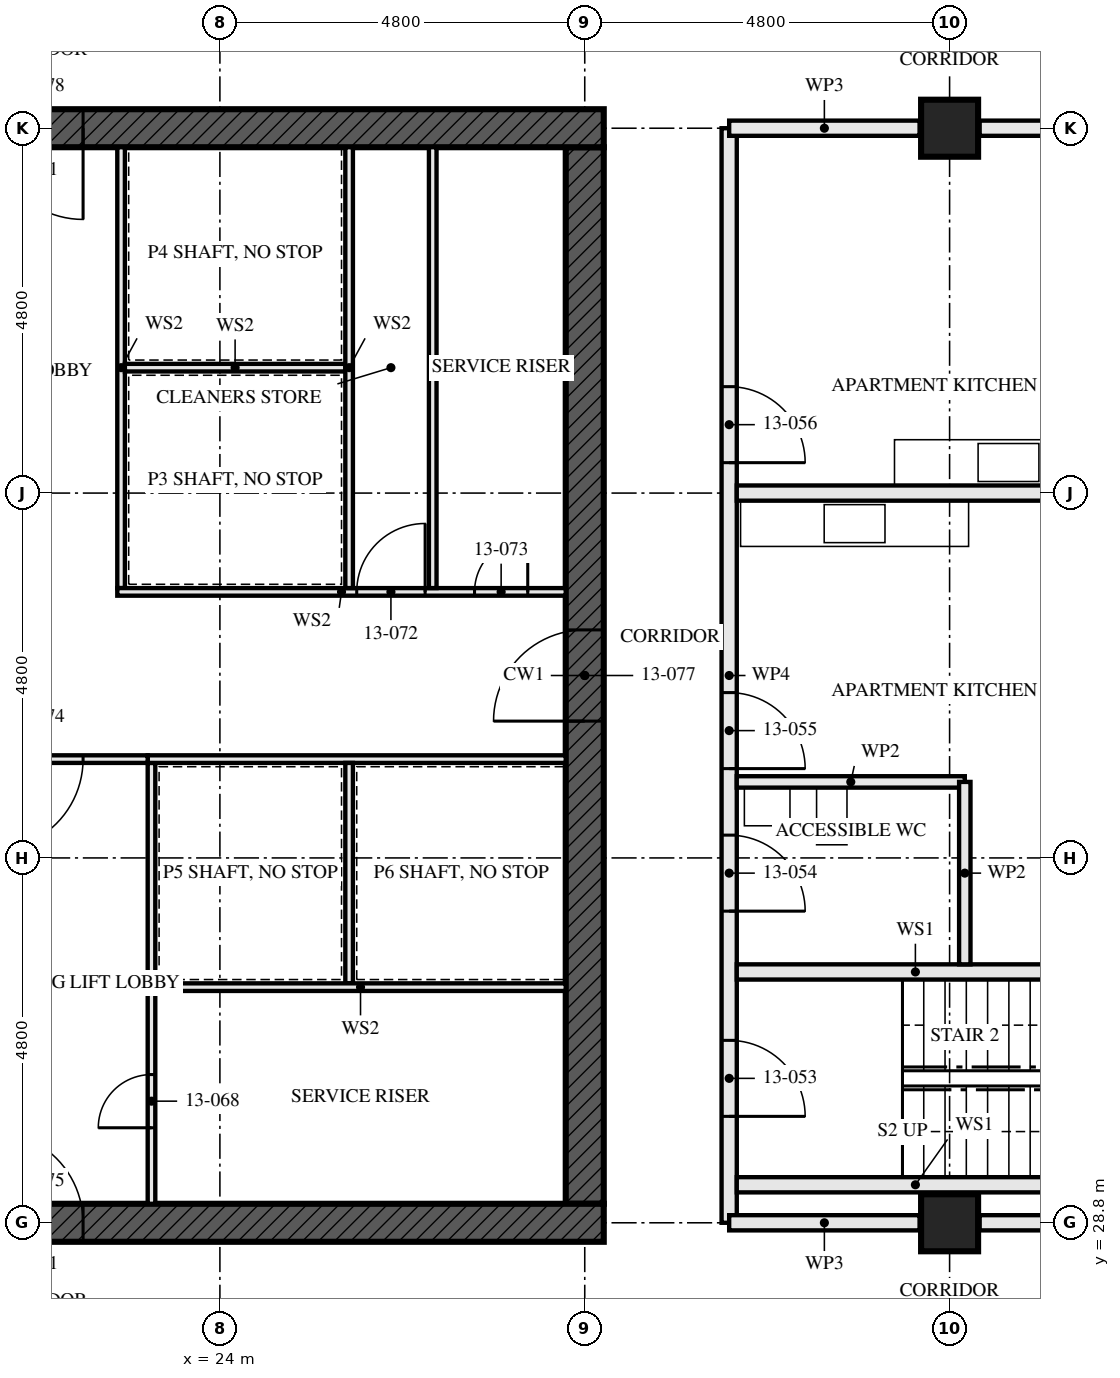
"""IFC4 building model, lengths in metres.
Left out: names, types, materials, properties, quantities, classifications, styles, units other than length and angle.
Written with IfcOpenShell. Run it as: python <this file> out.ifc"""

import sys

from ifc_helpers import new_model, si_unit, direction, frame, frame_2d, origin, origin_2d, place, context, subcontext, project, spatial, rectangle, hollow_rectangle, extrude, element, fill, save


model = new_model("IFC4")
c1 = context("Model", 3, precision=1e-05, world=origin(), true_north=direction((0.0, 1.0)))
c2 = subcontext(c1, "Body", "Model", "MODEL_VIEW")
j1 = project(units=[si_unit("LENGTHUNIT", "METRE"), si_unit("PLANEANGLEUNIT", "RADIAN")], contexts=[c1])
p1 = place(None, origin())
s1 = spatial("IfcSite", under=j1, at=p1, CompositionType="ELEMENT")
p2 = place(p1, origin())
s2 = spatial("IfcBuilding", under=s1, at=p2, CompositionType="ELEMENT")
p3 = place(p2, frame((0.0, 0.0, 51.5)))
s3 = spatial("IfcBuildingStorey", under=s2, at=p3, CompositionType="ELEMENT", Elevation=51.5)
for number, where, z_axis, x_axis in (
    (1, (33.6, 28.8, 0.0), (0.0, 0.0, 1.0), (0.0, 1.0, 0.0)),
    (2, (33.6, 43.2, 0.0), (0.0, 0.0, 1.0), (0.0, 1.0, 0.0)),
):
    element("IfcColumn", number, at=place(p3, frame(where, z_axis=z_axis, x_axis=x_axis)), inside=s3, PredefinedType="COLUMN", context=c2, shape_type="SweptSolid", body=[
        extrude(hollow_rectangle(XDim=0.75, YDim=0.75, WallThickness=0.08, at=origin_2d()), origin(), (0.0, 0.0, 1.0), 3.5),
    ])
p4 = place(p3, frame((14.15, 28.8, -0.17), z_axis=(0.0, 0.0, 1.0), x_axis=(1.0, 0.0, 0.0)))
e3 = element("IfcWall", 3, at=p4, inside=s3, PredefinedType="SHEAR", context=c2, shape_type="SweptSolid", body=[
    extrude(rectangle(XDim=14.9, YDim=0.5, at=frame_2d((7.45, 0.0))), origin(), (0.0, 0.0, 1.0), 3.5),
])
p5 = place(p4, frame((6.85, 0.0, 0.17)))
e4 = element("IfcOpeningElement", 4, at=p5, cuts=e3, PredefinedType="OPENING", context=c2, shape_type="SweptSolid", body=[
    extrude(rectangle(XDim=1.2, YDim=2.1, at=frame_2d((0.6, 1.05))), frame((0.0, 0.26, 0.0), z_axis=(0.0, -1.0, 0.0), x_axis=(1.0, 0.0, 0.0)), (0.0, 0.0, 1.0), 0.521),
])
p6 = place(p3, frame((29.05, 43.2, -0.17), z_axis=(0.0, 0.0, 1.0), x_axis=(-1.0, 0.0, 0.0)))
e5 = element("IfcWall", 5, at=p6, inside=s3, PredefinedType="SHEAR", context=c2, shape_type="SweptSolid", body=[
    extrude(rectangle(XDim=14.9, YDim=0.5, at=frame_2d((7.45, 0.0))), origin(), (0.0, 0.0, 1.0), 3.5),
])
p7 = place(p6, frame((6.85, 0.0, 0.17)))
e6 = element("IfcOpeningElement", 6, at=p7, cuts=e5, PredefinedType="OPENING", context=c2, shape_type="SweptSolid", body=[
    extrude(rectangle(XDim=1.2, YDim=2.1, at=frame_2d((0.6, 1.05))), frame((0.0, 0.26, 0.0), z_axis=(0.0, -1.0, 0.0), x_axis=(1.0, 0.0, 0.0)), (0.0, 0.0, 1.0), 0.521),
])
p8 = place(p3, frame((28.8, 29.05, -0.17), z_axis=(0.0, 0.0, 1.0), x_axis=(0.0, 1.0, 0.0)))
e7 = element("IfcWall", 7, at=p8, inside=s3, PredefinedType="SHEAR", context=c2, shape_type="SweptSolid", body=[
    extrude(rectangle(XDim=13.9, YDim=0.5, at=frame_2d((6.95, 0.0))), origin(), (0.0, 0.0, 1.0), 3.5),
])
p9 = place(p8, frame((6.35, 0.0, 0.17)))
e8 = element("IfcOpeningElement", 8, at=p9, cuts=e7, PredefinedType="OPENING", context=c2, shape_type="SweptSolid", body=[
    extrude(rectangle(XDim=1.2, YDim=2.1, at=frame_2d((0.6, 1.05))), frame((0.0, 0.26, 0.0), z_axis=(0.0, -1.0, 0.0), x_axis=(1.0, 0.0, 0.0)), (0.0, 0.0, 1.0), 0.521),
])
for number, where, z_axis, x_axis in (
    (9, (35.5, 29.3, 0.0), (0.0, 0.0, 1.0), (-1.0, 0.0, 0.0)),
    (10, (35.5, 32.1, 0.0), (0.0, 0.0, 1.0), (-1.0, 0.0, 0.0)),
):
    element("IfcWall", number, at=place(p3, frame(where, z_axis=z_axis, x_axis=x_axis)), inside=s3, PredefinedType="SOLIDWALL", context=c2, shape_type="SweptSolid", body=[
        extrude(rectangle(XDim=4.7, YDim=0.2, at=frame_2d((2.35, 0.0))), origin(), (0.0, 0.0, 1.0), 2.99),
    ])
p10 = place(p3, frame((33.8, 32.2, 0.0), z_axis=(0.0, 0.0, 1.0), x_axis=(0.0, 1.0, 0.0)))
e11 = element("IfcWall", 11, at=p10, inside=s3, PredefinedType="PARTITIONING", context=c2, shape_type="SweptSolid", body=[
    extrude(rectangle(XDim=2.4, YDim=0.15, at=frame_2d((1.2, 0.0))), origin(), (0.0, 0.0, 1.0), 2.55),
])
p11 = place(p3, frame((33.8, 34.6, 0.0), z_axis=(0.0, 0.0, 1.0), x_axis=(-1.0, 0.0, 0.0)))
e12 = element("IfcWall", 12, at=p11, inside=s3, PredefinedType="PARTITIONING", context=c2, shape_type="SweptSolid", body=[
    extrude(rectangle(XDim=3.0, YDim=0.15, at=frame_2d((1.5, 0.0))), origin(), (0.0, 0.0, 1.0), 3.33),
])
p12 = place(p3, frame((42.805, 38.4, 0.0), z_axis=(0.0, 0.0, 1.0), x_axis=(-1.0, 0.0, 0.0)))
e13 = element("IfcWall", 13, at=p12, inside=s3, PredefinedType="PARTITIONING", context=c2, shape_type="SweptSolid", body=[
    extrude(rectangle(XDim=12.005, YDim=0.2, at=frame_2d((6.002, 0.0))), origin(), (0.0, 0.0, 1.0), 2.55),
])
p13 = place(p3, frame((30.7, 28.8, 0.0), z_axis=(0.0, 0.0, 1.0), x_axis=(0.0, 1.0, 0.0)))
e14 = element("IfcWall", 14, at=p13, inside=s3, PredefinedType="PARTITIONING", context=c2, shape_type="SweptSolid", body=[
    extrude(rectangle(XDim=14.4, YDim=0.2, at=frame_2d((7.2, 0.0))), origin(), (0.0, 0.0, 1.0), 2.55),
])
p14 = place(p13, frame((1.4, 0.0, 0.0)))
e15 = element("IfcOpeningElement", 15, at=p14, cuts=e14, PredefinedType="OPENING", context=c2, shape_type="SweptSolid", body=[
    extrude(rectangle(XDim=1.0, YDim=2.1, at=frame_2d((0.5, 1.05))), frame((0.0, 0.111, 0.0), z_axis=(0.0, -1.0, 0.0), x_axis=(1.0, 0.0, 0.0)), (0.0, 0.0, 1.0), 0.221),
])
p15 = place(p13, frame((4.1, 0.0, 0.0)))
e16 = element("IfcOpeningElement", 16, at=p15, cuts=e14, PredefinedType="OPENING", context=c2, shape_type="SweptSolid", body=[
    extrude(rectangle(XDim=1.0, YDim=2.1, at=frame_2d((0.5, 1.05))), frame((0.0, 0.111, 0.0), z_axis=(0.0, -1.0, 0.0), x_axis=(1.0, 0.0, 0.0)), (0.0, 0.0, 1.0), 0.221),
])
p16 = place(p13, frame((5.975, 0.0, 0.0)))
e17 = element("IfcOpeningElement", 17, at=p16, cuts=e14, PredefinedType="OPENING", context=c2, shape_type="SweptSolid", body=[
    extrude(rectangle(XDim=1.0, YDim=2.1, at=frame_2d((0.5, 1.05))), frame((0.0, 0.111, 0.0), z_axis=(0.0, -1.0, 0.0), x_axis=(1.0, 0.0, 0.0)), (0.0, 0.0, 1.0), 0.221),
])
p17 = place(p13, frame((10.0, 0.0, 0.0)))
e18 = element("IfcOpeningElement", 18, at=p17, cuts=e14, PredefinedType="OPENING", context=c2, shape_type="SweptSolid", body=[
    extrude(rectangle(XDim=1.0, YDim=2.1, at=frame_2d((0.5, 1.05))), frame((0.0, 0.111, 0.0), z_axis=(0.0, -1.0, 0.0), x_axis=(1.0, 0.0, 0.0)), (0.0, 0.0, 1.0), 0.221),
])
for number, where, z_axis, x_axis in (
    (19, (26.8, 37.15, 0.0), (0.0, 0.0, 1.0), (0.0, 1.0, 0.0)),
    (20, (22.7, 37.15, 0.0), (0.0, 0.0, 1.0), (0.0, 1.0, 0.0)),
):
    element("IfcWall", number, at=place(p3, frame(where, z_axis=z_axis, x_axis=x_axis)), inside=s3, PredefinedType="SOLIDWALL", context=c2, shape_type="SweptSolid", body=[
        extrude(rectangle(XDim=5.8, YDim=0.1, at=frame_2d((2.9, 0.0))), origin(), (0.0, 0.0, 1.0), 3.33),
    ])
p18 = place(p3, frame((23.1, 29.05, 0.0), z_axis=(0.0, 0.0, 1.0), x_axis=(0.0, 1.0, 0.0)))
e21 = element("IfcWall", 21, at=p18, inside=s3, PredefinedType="SOLIDWALL", context=c2, shape_type="SweptSolid", body=[
    extrude(rectangle(XDim=5.8, YDim=0.1, at=frame_2d((2.9, 0.0))), origin(), (0.0, 0.0, 1.0), 3.33),
])
p19 = place(p18, frame((1.0, 0.0, 0.0)))
e22 = element("IfcOpeningElement", 22, at=p19, cuts=e21, PredefinedType="OPENING", context=c2, shape_type="SweptSolid", body=[
    extrude(rectangle(XDim=0.7, YDim=2.1, at=frame_2d((0.35, 1.05))), frame((0.0, 0.061, 0.0), z_axis=(0.0, -1.0, 0.0), x_axis=(1.0, 0.0, 0.0)), (0.0, 0.0, 1.0), 0.121),
])
p20 = place(p3, frame((23.05, 34.9, 0.0), z_axis=(0.0, 0.0, 1.0), x_axis=(1.0, 0.0, 0.0)))
e23 = element("IfcWall", 23, at=p20, inside=s3, PredefinedType="SOLIDWALL", context=c2, shape_type="SweptSolid", body=[
    extrude(rectangle(XDim=5.5, YDim=0.1, at=frame_2d((2.75, 0.0))), origin(), (0.0, 0.0, 1.0), 3.33),
])
p21 = place(p3, frame((22.65, 37.1, 0.0), z_axis=(0.0, 0.0, 1.0), x_axis=(1.0, 0.0, 0.0)))
e24 = element("IfcWall", 24, at=p21, inside=s3, PredefinedType="SOLIDWALL", context=c2, shape_type="SweptSolid", body=[
    extrude(rectangle(XDim=5.9, YDim=0.1, at=frame_2d((2.95, 0.0))), origin(), (0.0, 0.0, 1.0), 3.33),
])
p22 = place(p21, frame((3.15, 0.0, 0.0)))
e25 = element("IfcOpeningElement", 25, at=p22, cuts=e24, PredefinedType="OPENING", context=c2, shape_type="SweptSolid", body=[
    extrude(rectangle(XDim=0.9, YDim=2.1, at=frame_2d((0.45, 1.05))), frame((0.0, 0.061, 0.0), z_axis=(0.0, -1.0, 0.0), x_axis=(1.0, 0.0, 0.0)), (0.0, 0.0, 1.0), 0.121),
])
p23 = place(p21, frame((4.7, 0.0, 0.0)))
e26 = element("IfcOpeningElement", 26, at=p23, cuts=e24, PredefinedType="OPENING", context=c2, shape_type="SweptSolid", body=[
    extrude(rectangle(XDim=0.7, YDim=2.1, at=frame_2d((0.35, 1.05))), frame((0.0, 0.061, 0.0), z_axis=(0.0, -1.0, 0.0), x_axis=(1.0, 0.0, 0.0)), (0.0, 0.0, 1.0), 0.121),
])
p24 = place(p3, frame((20.55, 34.9, 0.0), z_axis=(0.0, 0.0, 1.0), x_axis=(1.0, 0.0, 0.0)))
e27 = element("IfcWall", 27, at=p24, inside=s3, PredefinedType="SOLIDWALL", context=c2, shape_type="SweptSolid", body=[
    extrude(rectangle(XDim=2.5, YDim=0.1, at=frame_2d((1.25, 0.0))), origin(), (0.0, 0.0, 1.0), 3.33),
])
p25 = place(p24, frame((0.45, 0.0, 0.0)))
e28 = element("IfcOpeningElement", 28, at=p25, cuts=e27, PredefinedType="OPENING", context=c2, shape_type="SweptSolid", body=[
    extrude(rectangle(XDim=1.2, YDim=2.1, at=frame_2d((0.6, 1.05))), frame((0.0, 0.061, 0.0), z_axis=(0.0, -1.0, 0.0), x_axis=(1.0, 0.0, 0.0)), (0.0, 0.0, 1.0), 0.121),
])
p26 = place(p3, frame((22.75, 40.05, 0.0), z_axis=(0.0, 0.0, 1.0), x_axis=(1.0, 0.0, 0.0)))
e29 = element("IfcWall", 29, at=p26, inside=s3, PredefinedType="SOLIDWALL", context=c2, shape_type="SweptSolid", body=[
    extrude(rectangle(XDim=2.9, YDim=0.1, at=frame_2d((1.45, 0.0))), origin(), (0.0, 0.0, 1.0), 3.33),
])
p27 = place(p3, frame((25.7, 37.15, 0.0), z_axis=(0.0, 0.0, 1.0), x_axis=(0.0, 1.0, 0.0)))
e30 = element("IfcWall", 30, at=p27, inside=s3, PredefinedType="SOLIDWALL", context=c2, shape_type="SweptSolid", body=[
    extrude(rectangle(XDim=5.8, YDim=0.1, at=frame_2d((2.9, 0.0))), origin(), (0.0, 0.0, 1.0), 3.33),
])
p28 = place(p3, frame((25.7, 31.95, 0.0), z_axis=(0.0, 0.0, 1.0), x_axis=(0.0, 1.0, 0.0)))
e31 = element("IfcWall", 31, at=p28, inside=s3, PredefinedType="SOLIDWALL", context=c2, shape_type="SweptSolid", body=[
    extrude(rectangle(XDim=2.9, YDim=0.1, at=frame_2d((1.45, 0.0))), origin(), (0.0, 0.0, 1.0), 3.33),
])
p29 = place(p3, frame((23.15, 31.9, 0.0), z_axis=(0.0, 0.0, 1.0), x_axis=(1.0, 0.0, 0.0)))
e32 = element("IfcWall", 32, at=p29, inside=s3, PredefinedType="SOLIDWALL", context=c2, shape_type="SweptSolid", body=[
    extrude(rectangle(XDim=5.4, YDim=0.1, at=frame_2d((2.7, 0.0))), origin(), (0.0, 0.0, 1.0), 3.33),
])
p30 = place(p3, frame((38.005, 28.8, 0.0), z_axis=(0.0, 0.0, 1.0), x_axis=(-1.0, 0.0, 0.0)))
e33 = element("IfcWall", 33, at=p30, inside=s3, PredefinedType="PARTITIONING", context=c2, shape_type="SweptSolid", body=[
    extrude(rectangle(XDim=4.01, YDim=0.2, at=frame_2d((2.005, 0.0))), origin(), (0.0, 0.0, 1.0), 2.32),
])
p31 = place(p3, frame((33.205, 28.8, 0.0), z_axis=(0.0, 0.0, 1.0), x_axis=(-1.0, 0.0, 0.0)))
e34 = element("IfcWall", 34, at=p31, inside=s3, PredefinedType="PARTITIONING", context=c2, shape_type="SweptSolid", body=[
    extrude(rectangle(XDim=2.505, YDim=0.2, at=frame_2d((1.252, 0.0))), origin(), (0.0, 0.0, 1.0), 2.32),
])
p32 = place(p3, frame((38.005, 43.2, 0.0), z_axis=(0.0, 0.0, 1.0), x_axis=(-1.0, 0.0, 0.0)))
e35 = element("IfcWall", 35, at=p32, inside=s3, PredefinedType="PARTITIONING", context=c2, shape_type="SweptSolid", body=[
    extrude(rectangle(XDim=4.01, YDim=0.2, at=frame_2d((2.005, 0.0))), origin(), (0.0, 0.0, 1.0), 2.32),
])
p33 = place(p3, frame((33.205, 43.2, 0.0), z_axis=(0.0, 0.0, 1.0), x_axis=(-1.0, 0.0, 0.0)))
e36 = element("IfcWall", 36, at=p33, inside=s3, PredefinedType="PARTITIONING", context=c2, shape_type="SweptSolid", body=[
    extrude(rectangle(XDim=2.505, YDim=0.2, at=frame_2d((1.252, 0.0))), origin(), (0.0, 0.0, 1.0), 2.32),
])
p34 = place(p14, frame((1.0, 0.0, 0.0), z_axis=(0.0, 0.0, 1.0), x_axis=(-1.0, 0.0, 0.0)))
e37 = element("IfcDoor", 37, at=p34, inside=s3, OperationType="SINGLE_SWING_LEFT", PredefinedType="DOOR", context=c2, shape_type="SweptSolid", body=[
    extrude(rectangle(XDim=1.0, YDim=2.1, at=frame_2d((0.5, 1.05))), frame((0.0, 0.032, 0.0), z_axis=(0.0, -1.0, 0.0), x_axis=(1.0, 0.0, 0.0)), (0.0, 0.0, 1.0), 0.064),
])
fill(e15, e37)
p35 = place(p15, frame((1.0, 0.0, 0.0), z_axis=(0.0, 0.0, 1.0), x_axis=(-1.0, 0.0, 0.0)))
e38 = element("IfcDoor", 38, at=p35, inside=s3, OperationType="SINGLE_SWING_LEFT", PredefinedType="DOOR", context=c2, shape_type="SweptSolid", body=[
    extrude(rectangle(XDim=1.0, YDim=2.1, at=frame_2d((0.5, 1.05))), frame((0.0, 0.027, 0.0), z_axis=(0.0, -1.0, 0.0), x_axis=(1.0, 0.0, 0.0)), (0.0, 0.0, 1.0), 0.054),
])
fill(e16, e38)
p36 = place(p16, frame((1.0, 0.0, 0.0), z_axis=(0.0, 0.0, 1.0), x_axis=(-1.0, 0.0, 0.0)))
e39 = element("IfcDoor", 39, at=p36, inside=s3, OperationType="SINGLE_SWING_LEFT", PredefinedType="DOOR", context=c2, shape_type="SweptSolid", body=[
    extrude(rectangle(XDim=1.0, YDim=2.1, at=frame_2d((0.5, 1.05))), frame((0.0, 0.027, 0.0), z_axis=(0.0, -1.0, 0.0), x_axis=(1.0, 0.0, 0.0)), (0.0, 0.0, 1.0), 0.054),
])
fill(e17, e39)
p37 = place(p17, frame((1.0, 0.0, 0.0), z_axis=(0.0, 0.0, 1.0), x_axis=(-1.0, 0.0, 0.0)))
e40 = element("IfcDoor", 40, at=p37, inside=s3, OperationType="SINGLE_SWING_LEFT", PredefinedType="DOOR", context=c2, shape_type="SweptSolid", body=[
    extrude(rectangle(XDim=1.0, YDim=2.1, at=frame_2d((0.5, 1.05))), frame((0.0, 0.027, 0.0), z_axis=(0.0, -1.0, 0.0), x_axis=(1.0, 0.0, 0.0)), (0.0, 0.0, 1.0), 0.054),
])
fill(e18, e40)
p38 = place(p19, origin())
e41 = element("IfcDoor", 41, at=p38, inside=s3, OperationType="SINGLE_SWING_RIGHT", PredefinedType="DOOR", context=c2, shape_type="SweptSolid", body=[
    extrude(rectangle(XDim=0.7, YDim=2.1, at=frame_2d((0.35, 1.05))), frame((0.0, 0.027, 0.0), z_axis=(0.0, -1.0, 0.0), x_axis=(1.0, 0.0, 0.0)), (0.0, 0.0, 1.0), 0.054),
])
fill(e22, e41)
p39 = place(p22, origin())
e42 = element("IfcDoor", 42, at=p39, inside=s3, OperationType="SINGLE_SWING_LEFT", PredefinedType="DOOR", context=c2, shape_type="SweptSolid", body=[
    extrude(rectangle(XDim=0.9, YDim=2.1, at=frame_2d((0.45, 1.05))), frame((0.0, 0.027, 0.0), z_axis=(0.0, -1.0, 0.0), x_axis=(1.0, 0.0, 0.0)), (0.0, 0.0, 1.0), 0.054),
])
fill(e25, e42)
p40 = place(p23, origin())
e43 = element("IfcDoor", 43, at=p40, inside=s3, OperationType="SINGLE_SWING_LEFT", PredefinedType="DOOR", context=c2, shape_type="SweptSolid", body=[
    extrude(rectangle(XDim=0.7, YDim=2.1, at=frame_2d((0.35, 1.05))), frame((0.0, 0.027, 0.0), z_axis=(0.0, -1.0, 0.0), x_axis=(1.0, 0.0, 0.0)), (0.0, 0.0, 1.0), 0.054),
])
fill(e26, e43)
p41 = place(p25, frame((1.2, 0.0, 0.0), z_axis=(0.0, 0.0, 1.0), x_axis=(-1.0, 0.0, 0.0)))
e44 = element("IfcDoor", 44, at=p41, inside=s3, OperationType="SINGLE_SWING_LEFT", PredefinedType="DOOR", context=c2, shape_type="SweptSolid", body=[
    extrude(rectangle(XDim=1.2, YDim=2.1, at=frame_2d((0.6, 1.05))), frame((0.0, 0.027, 0.0), z_axis=(0.0, -1.0, 0.0), x_axis=(1.0, 0.0, 0.0)), (0.0, 0.0, 1.0), 0.054),
])
fill(e28, e44)
p42 = place(p5, origin())
e45 = element("IfcDoor", 45, at=p42, inside=s3, OperationType="SINGLE_SWING_LEFT", PredefinedType="DOOR", context=c2, shape_type="SweptSolid", body=[
    extrude(rectangle(XDim=1.2, YDim=2.1, at=frame_2d((0.6, 1.05))), frame((0.0, 0.027, 0.0), z_axis=(0.0, -1.0, 0.0), x_axis=(1.0, 0.0, 0.0)), (0.0, 0.0, 1.0), 0.054),
])
fill(e4, e45)
p43 = place(p9, origin())
e46 = element("IfcDoor", 46, at=p43, inside=s3, OperationType="SINGLE_SWING_LEFT", PredefinedType="DOOR", context=c2, shape_type="SweptSolid", body=[
    extrude(rectangle(XDim=1.2, YDim=2.1, at=frame_2d((0.6, 1.05))), frame((0.0, 0.027, 0.0), z_axis=(0.0, -1.0, 0.0), x_axis=(1.0, 0.0, 0.0)), (0.0, 0.0, 1.0), 0.054),
])
fill(e8, e46)
p44 = place(p7, origin())
e47 = element("IfcDoor", 47, at=p44, inside=s3, OperationType="SINGLE_SWING_LEFT", PredefinedType="DOOR", context=c2, shape_type="SweptSolid", body=[
    extrude(rectangle(XDim=1.2, YDim=2.1, at=frame_2d((0.6, 1.05))), frame((0.0, 0.027, 0.0), z_axis=(0.0, -1.0, 0.0), x_axis=(1.0, 0.0, 0.0)), (0.0, 0.0, 1.0), 0.054),
])
fill(e6, e47)
save(model, sys.argv[1])
